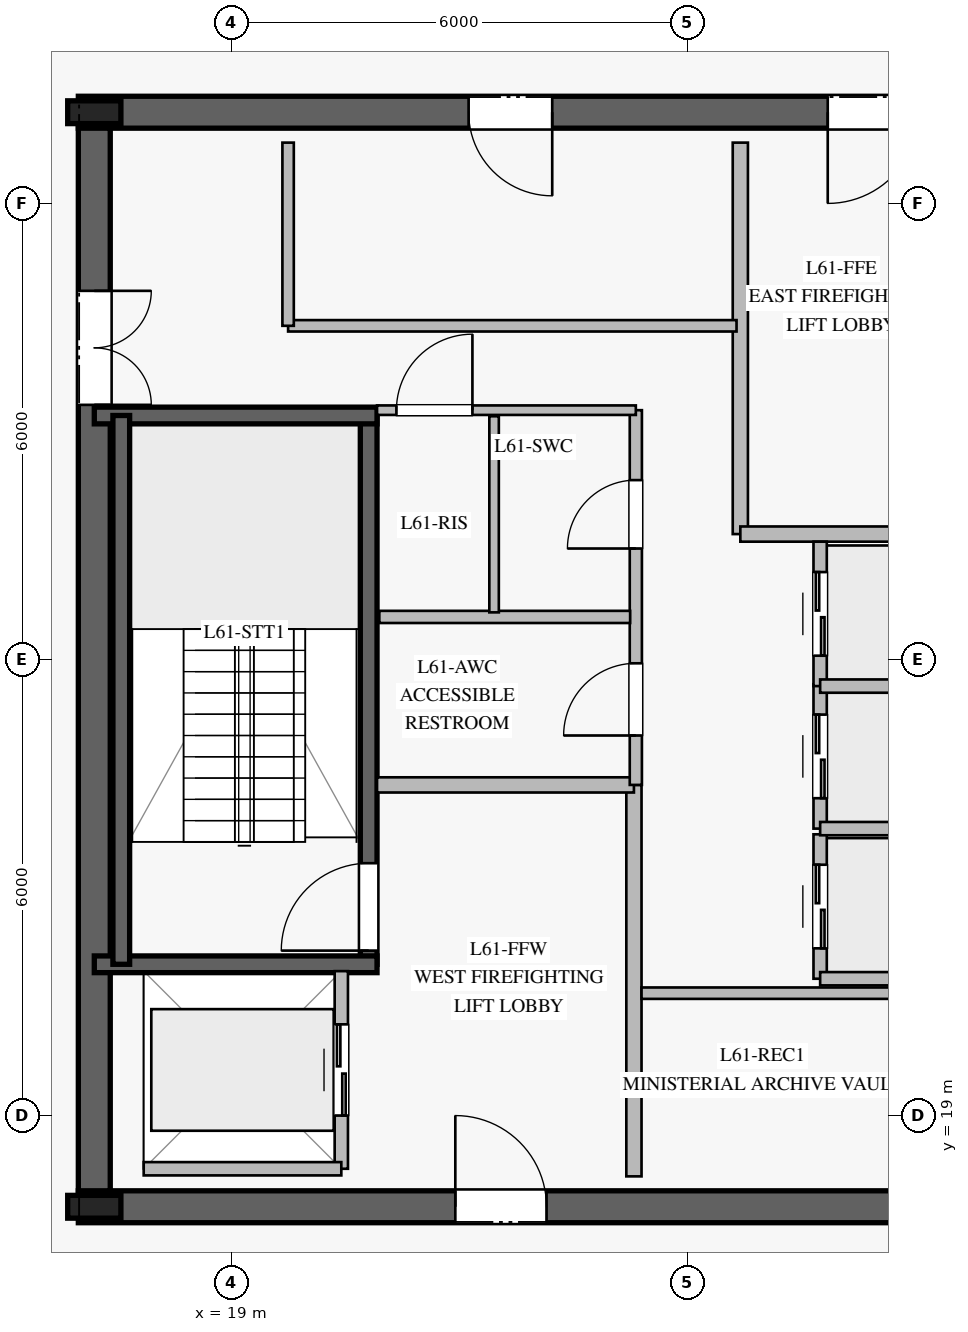
"""IFC4 building model, lengths in metres.
Left out: names, types, materials, properties, quantities, classifications, styles, units other than length and angle.
Written with IfcOpenShell. Run it as: python <this file> out.ifc"""

import sys

from ifc_helpers import new_model, si_unit, direction, frame, frame_2d, origin, origin_2d, place, context, subcontext, project, spatial, rectangle, i_section, extrude, element, fill, save


model = new_model("IFC4")
c1 = context("Model", 3, precision=1e-05, world=origin(), true_north=direction((0.0, 1.0)))
c2 = subcontext(c1, "Body", "Model", "MODEL_VIEW")
j1 = project(units=[si_unit("LENGTHUNIT", "METRE"), si_unit("PLANEANGLEUNIT", "RADIAN")], contexts=[c1])
p1 = place(None, origin())
s1 = spatial("IfcSite", under=j1, at=p1, CompositionType="ELEMENT")
p2 = place(p1, origin())
s2 = spatial("IfcBuilding", under=s1, at=p2, CompositionType="ELEMENT")
p3 = place(p2, frame((0.0, 0.0, 254.2)))
s3 = spatial("IfcBuildingStorey", under=s2, at=p3, CompositionType="ELEMENT", Elevation=254.2)
p4 = place(p3, frame((16.99, 17.8, 0.0), z_axis=(0.0, 0.0, 1.0), x_axis=(1.0, 0.0, 0.0)))
e1 = element("IfcWall", 1, at=p4, inside=s3, PredefinedType="SHEAR", context=c2, shape_type="SweptSolid", body=[
    extrude(rectangle(XDim=16.02, YDim=0.42, at=frame_2d((8.01, 0.0))), origin(), (0.0, 0.0, 1.0), 3.78),
])
p5 = place(p4, frame((4.96, 0.0, 0.0)))
e2 = element("IfcOpeningElement", 2, at=p5, cuts=e1, PredefinedType="OPENING", context=c2, shape_type="SweptSolid", body=[
    extrude(rectangle(XDim=1.2, YDim=2.25, at=frame_2d((0.6, 1.125))), frame((0.0, 0.22, 0.0), z_axis=(0.0, -1.0, 0.0), x_axis=(1.0, 0.0, 0.0)), (0.0, 0.0, 1.0), 0.44),
])
p6 = place(p4, frame((10.86, 0.0, 0.0)))
e3 = element("IfcOpeningElement", 3, at=p6, cuts=e1, PredefinedType="OPENING", context=c2, shape_type="SweptSolid", body=[
    extrude(rectangle(XDim=1.1, YDim=2.2, at=frame_2d((0.55, 1.1))), frame((0.0, 0.22, 0.0), z_axis=(0.0, -1.0, 0.0), x_axis=(1.0, 0.0, 0.0)), (0.0, 0.0, 1.0), 0.44),
])
p7 = place(p3, frame((33.01, 32.2, 0.0), z_axis=(0.0, 0.0, 1.0), x_axis=(-1.0, 0.0, 0.0)))
e4 = element("IfcWall", 4, at=p7, inside=s3, PredefinedType="SHEAR", context=c2, shape_type="SweptSolid", body=[
    extrude(rectangle(XDim=16.02, YDim=0.42, at=frame_2d((8.01, 0.0))), origin(), (0.0, 0.0, 1.0), 3.78),
])
p8 = place(p7, frame((4.96, 0.0, 0.0)))
e5 = element("IfcOpeningElement", 5, at=p8, cuts=e4, PredefinedType="OPENING", context=c2, shape_type="SweptSolid", body=[
    extrude(rectangle(XDim=1.2, YDim=2.25, at=frame_2d((0.6, 1.125))), frame((0.0, 0.22, 0.0), z_axis=(0.0, -1.0, 0.0), x_axis=(1.0, 0.0, 0.0)), (0.0, 0.0, 1.0), 0.44),
])
p9 = place(p7, frame((9.785, 0.0, 0.0)))
e6 = element("IfcOpeningElement", 6, at=p9, cuts=e4, PredefinedType="OPENING", context=c2, shape_type="SweptSolid", body=[
    extrude(rectangle(XDim=1.1, YDim=2.2, at=frame_2d((0.55, 1.1))), frame((0.0, 0.22, 0.0), z_axis=(0.0, -1.0, 0.0), x_axis=(1.0, 0.0, 0.0)), (0.0, 0.0, 1.0), 0.44),
])
p10 = place(p3, frame((17.2, 31.99, 0.0), z_axis=(0.0, 0.0, 1.0), x_axis=(0.0, -1.0, 0.0)))
e7 = element("IfcWall", 7, at=p10, inside=s3, PredefinedType="SHEAR", context=c2, shape_type="SweptSolid", body=[
    extrude(rectangle(XDim=13.98, YDim=0.42, at=frame_2d((6.99, 0.0))), origin(), (0.0, 0.0, 1.0), 3.78),
])
p11 = place(p10, frame((2.14, 0.0, 0.0)))
e8 = element("IfcOpeningElement", 8, at=p11, cuts=e7, PredefinedType="OPENING", context=c2, shape_type="SweptSolid", body=[
    extrude(rectangle(XDim=1.5, YDim=2.2, at=frame_2d((0.75, 1.1))), frame((0.0, 0.22, 0.0), z_axis=(0.0, -1.0, 0.0), x_axis=(1.0, 0.0, 0.0)), (0.0, 0.0, 1.0), 0.44),
])
for number, where, z_axis, x_axis in (
    (9, (17.2, 17.8, 0.0), (0.0, 0.0, 1.0), (1.0, 0.0, 0.0)),
    (10, (17.2, 32.2, 0.0), (0.0, 0.0, 1.0), (1.0, 0.0, 0.0)),
):
    element("IfcColumn", number, at=place(p3, frame(where, z_axis=z_axis, x_axis=x_axis)), inside=s3, PredefinedType="COLUMN", context=c2, shape_type="SweptSolid", body=[
        extrude(i_section(OverallWidth=0.3, OverallDepth=0.7, WebThickness=0.017, FlangeThickness=0.032, at=origin_2d()), origin(), (0.0, 0.0, 1.0), 4.0),
    ])
p12 = place(p3, frame((20.81, 20.99, 0.0), z_axis=(0.0, 0.0, 1.0), x_axis=(0.0, 1.0, 0.0)))
e11 = element("IfcWall", 11, at=p12, inside=s3, PredefinedType="SOLIDWALL", context=c2, shape_type="SweptSolid", body=[
    extrude(rectangle(XDim=7.22, YDim=0.22, at=frame_2d((3.61, 0.0))), origin(), (0.0, 0.0, 1.0), 3.78),
])
p13 = place(p12, frame((0.18, 0.0, 0.0)))
e12 = element("IfcOpeningElement", 12, at=p13, cuts=e11, PredefinedType="OPENING", context=c2, shape_type="SweptSolid", body=[
    extrude(rectangle(XDim=1.15, YDim=2.2, at=frame_2d((0.575, 1.1))), frame((0.0, 0.12, 0.0), z_axis=(0.0, -1.0, 0.0), x_axis=(1.0, 0.0, 0.0)), (0.0, 0.0, 1.0), 0.24),
])
for number, where, z_axis, x_axis in (
    (13, (17.2, 20.99, 0.0), (0.0, 0.0, 1.0), (1.0, 0.0, 0.0)),
    (14, (17.2, 28.21, 0.0), (0.0, 0.0, 1.0), (1.0, 0.0, 0.0)),
):
    element("IfcWall", number, at=place(p3, frame(where, z_axis=z_axis, x_axis=x_axis)), inside=s3, PredefinedType="SOLIDWALL", context=c2, shape_type="SweptSolid", body=[
        extrude(rectangle(XDim=3.72, YDim=0.22, at=frame_2d((1.86, 0.0))), origin(), (0.0, 0.0, 1.0), 3.78),
    ])
p14 = place(p3, frame((17.555, 28.21, 0.0), z_axis=(0.0, 0.0, 1.0), x_axis=(0.0, -1.0, 0.0)))
e15 = element("IfcWall", 15, at=p14, inside=s3, PredefinedType="SOLIDWALL", context=c2, shape_type="SweptSolid", body=[
    extrude(rectangle(XDim=7.22, YDim=0.22, at=frame_2d((3.61, 0.0))), origin(), (0.0, 0.0, 1.0), 3.78),
])
p15 = place(p3, frame((24.3, 18.2, 0.0), z_axis=(0.0, 0.0, 1.0), x_axis=(0.0, 1.0, 0.0)))
e16 = element("IfcWall", 16, at=p15, inside=s3, PredefinedType="PARTITIONING", context=c2, shape_type="SweptSolid", body=[
    extrude(rectangle(XDim=5.15, YDim=0.2, at=frame_2d((2.575, 0.0))), origin(), (0.0, 0.0, 1.0), 3.78),
])
p16 = place(p3, frame((20.92, 23.35, 0.0), z_axis=(0.0, 0.0, 1.0), x_axis=(1.0, 0.0, 0.0)))
e17 = element("IfcWall", 17, at=p16, inside=s3, PredefinedType="PARTITIONING", context=c2, shape_type="SweptSolid", body=[
    extrude(rectangle(XDim=3.38, YDim=0.2, at=frame_2d((1.69, 0.0))), origin(), (0.0, 0.0, 1.0), 3.78),
])
p17 = place(p3, frame((25.7, 26.65, 0.0), z_axis=(0.0, 0.0, 1.0), x_axis=(0.0, 1.0, 0.0)))
e18 = element("IfcWall", 18, at=p17, inside=s3, PredefinedType="PARTITIONING", context=c2, shape_type="SweptSolid", body=[
    extrude(rectangle(XDim=5.15, YDim=0.2, at=frame_2d((2.575, 0.0))), origin(), (0.0, 0.0, 1.0), 3.78),
])
p18 = place(p3, frame((25.7, 26.65, 0.0), z_axis=(0.0, 0.0, 1.0), x_axis=(1.0, 0.0, 0.0)))
e19 = element("IfcWall", 19, at=p18, inside=s3, PredefinedType="PARTITIONING", context=c2, shape_type="SweptSolid", body=[
    extrude(rectangle(XDim=3.38, YDim=0.2, at=frame_2d((1.69, 0.0))), origin(), (0.0, 0.0, 1.0), 3.78),
])
p19 = place(p3, frame((24.325, 23.35, 0.0), z_axis=(0.0, 0.0, 1.0), x_axis=(0.0, 1.0, 0.0)))
e20 = element("IfcWall", 20, at=p19, inside=s3, PredefinedType="PLUMBINGWALL", context=c2, shape_type="SweptSolid", body=[
    extrude(rectangle(XDim=4.93, YDim=0.16, at=frame_2d((2.465, 0.0))), origin(), (0.0, 0.0, 1.0), 3.78),
])
p20 = place(p19, frame((0.65, 0.0, 0.0)))
e21 = element("IfcOpeningElement", 21, at=p20, cuts=e20, PredefinedType="OPENING", context=c2, shape_type="SweptSolid", body=[
    extrude(rectangle(XDim=0.95, YDim=2.1, at=frame_2d((0.475, 1.05))), frame((0.0, 0.09, 0.0), z_axis=(0.0, -1.0, 0.0), x_axis=(1.0, 0.0, 0.0)), (0.0, 0.0, 1.0), 0.18),
])
p21 = place(p19, frame((3.11, 0.0, 0.0)))
e22 = element("IfcOpeningElement", 22, at=p21, cuts=e20, PredefinedType="OPENING", context=c2, shape_type="SweptSolid", body=[
    extrude(rectangle(XDim=0.9, YDim=2.1, at=frame_2d((0.45, 1.05))), frame((0.0, 0.09, 0.0), z_axis=(0.0, -1.0, 0.0), x_axis=(1.0, 0.0, 0.0)), (0.0, 0.0, 1.0), 0.18),
])
p22 = place(p3, frame((20.92, 28.28, 0.0), z_axis=(0.0, 0.0, 1.0), x_axis=(1.0, 0.0, 0.0)))
e23 = element("IfcWall", 23, at=p22, inside=s3, PredefinedType="PARTITIONING", context=c2, shape_type="SweptSolid", body=[
    extrude(rectangle(XDim=3.405, YDim=0.125, at=frame_2d((1.703, 0.0))), origin(), (0.0, 0.0, 1.0), 3.78),
])
p23 = place(p22, frame((0.255, 0.0, 0.0)))
e24 = element("IfcOpeningElement", 24, at=p23, cuts=e23, PredefinedType="OPENING", context=c2, shape_type="SweptSolid", body=[
    extrude(rectangle(XDim=1.0, YDim=2.15, at=frame_2d((0.5, 1.075))), frame((0.0, 0.073, 0.0), z_axis=(0.0, -1.0, 0.0), x_axis=(1.0, 0.0, 0.0)), (0.0, 0.0, 1.0), 0.145),
])
p24 = place(p3, frame((20.95, 25.56, 0.0), z_axis=(0.0, 0.0, 1.0), x_axis=(1.0, 0.0, 0.0)))
e25 = element("IfcWall", 25, at=p24, inside=s3, PredefinedType="PLUMBINGWALL", context=c2, shape_type="SweptSolid", body=[
    extrude(rectangle(XDim=3.3, YDim=0.16, at=frame_2d((1.65, 0.0))), origin(), (0.0, 0.0, 1.0), 3.78),
])
p25 = place(p3, frame((22.46, 25.62, 0.0), z_axis=(0.0, 0.0, 1.0), x_axis=(0.0, 1.0, 0.0)))
e26 = element("IfcWall", 26, at=p25, inside=s3, PredefinedType="PARTITIONING", context=c2, shape_type="SweptSolid", body=[
    extrude(rectangle(XDim=2.58, YDim=0.125, at=frame_2d((1.29, 0.0))), origin(), (0.0, 0.0, 1.0), 3.78),
])
p26 = place(p3, frame((24.4, 20.61, 0.0), z_axis=(0.0, 0.0, 1.0), x_axis=(1.0, 0.0, 0.0)))
e27 = element("IfcWall", 27, at=p26, inside=s3, PredefinedType="PARTITIONING", context=c2, shape_type="SweptSolid", body=[
    extrude(rectangle(XDim=5.9, YDim=0.15, at=frame_2d((2.95, 0.0))), origin(), (0.0, 0.0, 1.0), 3.78),
])
p27 = place(p3, frame((19.75, 29.39, 0.0), z_axis=(0.0, 0.0, 1.0), x_axis=(1.0, 0.0, 0.0)))
e28 = element("IfcWall", 28, at=p27, inside=s3, PredefinedType="PARTITIONING", context=c2, shape_type="SweptSolid", body=[
    extrude(rectangle(XDim=5.9, YDim=0.15, at=frame_2d((2.95, 0.0))), origin(), (0.0, 0.0, 1.0), 3.78),
])
p28 = place(p3, frame((19.75, 29.39, 0.0), z_axis=(0.0, 0.0, 1.0), x_axis=(0.0, 1.0, 0.0)))
e29 = element("IfcWall", 29, at=p28, inside=s3, PredefinedType="PARTITIONING", context=c2, shape_type="SweptSolid", body=[
    extrude(rectangle(XDim=2.41, YDim=0.15, at=frame_2d((1.205, 0.0))), origin(), (0.0, 0.0, 1.0), 3.78),
])
p29 = place(p3, frame((26.75, 20.8, 0.0), z_axis=(0.0, 0.0, 1.0), x_axis=(0.0, 1.0, 0.0)))
e30 = element("IfcWall", 30, at=p29, inside=s3, PredefinedType="PARTITIONING", context=c2, shape_type="SweptSolid", body=[
    extrude(rectangle(XDim=1.9, YDim=0.175, at=frame_2d((0.95, 0.0))), origin(), (0.0, 0.0, 1.0), 3.78),
])
p30 = place(p29, frame((0.4, 0.0, 0.0)))
e31 = element("IfcOpeningElement", 31, at=p30, cuts=e30, PredefinedType="OPENING", context=c2, shape_type="SweptSolid", body=[
    extrude(rectangle(XDim=1.1, YDim=2.2, at=frame_2d((0.55, 1.1))), frame((0.0, 0.098, 0.0), z_axis=(0.0, -1.0, 0.0), x_axis=(1.0, 0.0, 0.0)), (0.0, 0.0, 1.0), 0.195),
])
p31 = place(p3, frame((26.75, 20.8, 0.0), z_axis=(0.0, 0.0, 1.0), x_axis=(1.0, 0.0, 0.0)))
e32 = element("IfcWall", 32, at=p31, inside=s3, PredefinedType="PARTITIONING", context=c2, shape_type="SweptSolid", body=[
    extrude(rectangle(XDim=2.35, YDim=0.175, at=frame_2d((1.175, 0.0))), origin(), (0.0, 0.0, 1.0), 3.78),
])
p32 = place(p3, frame((26.75, 22.775, 0.0), z_axis=(0.0, 0.0, 1.0), x_axis=(0.0, 1.0, 0.0)))
e33 = element("IfcWall", 33, at=p32, inside=s3, PredefinedType="PARTITIONING", context=c2, shape_type="SweptSolid", body=[
    extrude(rectangle(XDim=1.9, YDim=0.175, at=frame_2d((0.95, 0.0))), origin(), (0.0, 0.0, 1.0), 3.78),
])
p33 = place(p32, frame((0.4, 0.0, 0.0)))
e34 = element("IfcOpeningElement", 34, at=p33, cuts=e33, PredefinedType="OPENING", context=c2, shape_type="SweptSolid", body=[
    extrude(rectangle(XDim=1.1, YDim=2.2, at=frame_2d((0.55, 1.1))), frame((0.0, 0.098, 0.0), z_axis=(0.0, -1.0, 0.0), x_axis=(1.0, 0.0, 0.0)), (0.0, 0.0, 1.0), 0.195),
])
p34 = place(p3, frame((26.75, 22.775, 0.0), z_axis=(0.0, 0.0, 1.0), x_axis=(1.0, 0.0, 0.0)))
e35 = element("IfcWall", 35, at=p34, inside=s3, PredefinedType="PARTITIONING", context=c2, shape_type="SweptSolid", body=[
    extrude(rectangle(XDim=2.35, YDim=0.175, at=frame_2d((1.175, 0.0))), origin(), (0.0, 0.0, 1.0), 3.78),
])
p35 = place(p3, frame((26.75, 24.65, 0.0), z_axis=(0.0, 0.0, 1.0), x_axis=(0.0, 1.0, 0.0)))
e36 = element("IfcWall", 36, at=p35, inside=s3, PredefinedType="PARTITIONING", context=c2, shape_type="SweptSolid", body=[
    extrude(rectangle(XDim=1.9, YDim=0.175, at=frame_2d((0.95, 0.0))), origin(), (0.0, 0.0, 1.0), 3.78),
])
p36 = place(p35, frame((0.4, 0.0, 0.0)))
e37 = element("IfcOpeningElement", 37, at=p36, cuts=e36, PredefinedType="OPENING", context=c2, shape_type="SweptSolid", body=[
    extrude(rectangle(XDim=1.1, YDim=2.2, at=frame_2d((0.55, 1.1))), frame((0.0, 0.098, 0.0), z_axis=(0.0, -1.0, 0.0), x_axis=(1.0, 0.0, 0.0)), (0.0, 0.0, 1.0), 0.195),
])
p37 = place(p3, frame((26.75, 24.65, 0.0), z_axis=(0.0, 0.0, 1.0), x_axis=(1.0, 0.0, 0.0)))
e38 = element("IfcWall", 38, at=p37, inside=s3, PredefinedType="PARTITIONING", context=c2, shape_type="SweptSolid", body=[
    extrude(rectangle(XDim=2.35, YDim=0.175, at=frame_2d((1.175, 0.0))), origin(), (0.0, 0.0, 1.0), 3.78),
])
p38 = place(p3, frame((20.45, 18.3, 0.0), z_axis=(0.0, 0.0, 1.0), x_axis=(0.0, 1.0, 0.0)))
e39 = element("IfcWall", 39, at=p38, inside=s3, PredefinedType="PARTITIONING", context=c2, shape_type="SweptSolid", body=[
    extrude(rectangle(XDim=2.6, YDim=0.175, at=frame_2d((1.3, 0.0))), origin(), (0.0, 0.0, 1.0), 3.78),
])
p39 = place(p38, frame((0.7, 0.0, 0.0)))
e40 = element("IfcOpeningElement", 40, at=p39, cuts=e39, PredefinedType="OPENING", context=c2, shape_type="SweptSolid", body=[
    extrude(rectangle(XDim=1.2, YDim=2.2, at=frame_2d((0.6, 1.1))), frame((0.0, 0.098, 0.0), z_axis=(0.0, -1.0, 0.0), x_axis=(1.0, 0.0, 0.0)), (0.0, 0.0, 1.0), 0.195),
])
p40 = place(p3, frame((17.85, 18.3, 0.0), z_axis=(0.0, 0.0, 1.0), x_axis=(1.0, 0.0, 0.0)))
e41 = element("IfcWall", 41, at=p40, inside=s3, PredefinedType="PARTITIONING", context=c2, shape_type="SweptSolid", body=[
    extrude(rectangle(XDim=2.6, YDim=0.175, at=frame_2d((1.3, 0.0))), origin(), (0.0, 0.0, 1.0), 3.78),
])
p41 = place(p13, origin())
e42 = element("IfcDoor", 42, at=p41, inside=s3, OperationType="SINGLE_SWING_LEFT", PredefinedType="DOOR", context=c2, shape_type="SweptSolid", body=[
    extrude(rectangle(XDim=1.15, YDim=2.2, at=frame_2d((0.575, 1.1))), frame((0.0, 0.025, 0.0), z_axis=(0.0, -1.0, 0.0), x_axis=(1.0, 0.0, 0.0)), (0.0, 0.0, 1.0), 0.05),
])
fill(e12, e42)
p42 = place(p5, origin())
e43 = element("IfcDoor", 43, at=p42, inside=s3, OperationType="SINGLE_SWING_LEFT", PredefinedType="DOOR", context=c2, shape_type="SweptSolid", body=[
    extrude(rectangle(XDim=1.2, YDim=2.25, at=frame_2d((0.6, 1.125))), frame((0.0, 0.025, 0.0), z_axis=(0.0, -1.0, 0.0), x_axis=(1.0, 0.0, 0.0)), (0.0, 0.0, 1.0), 0.05),
])
fill(e2, e43)
p43 = place(p8, origin())
e44 = element("IfcDoor", 44, at=p43, inside=s3, OperationType="SINGLE_SWING_RIGHT", PredefinedType="DOOR", context=c2, shape_type="SweptSolid", body=[
    extrude(rectangle(XDim=1.2, YDim=2.25, at=frame_2d((0.6, 1.125))), frame((0.0, 0.025, 0.0), z_axis=(0.0, -1.0, 0.0), x_axis=(1.0, 0.0, 0.0)), (0.0, 0.0, 1.0), 0.05),
])
fill(e5, e44)
p44 = place(p11, origin())
e45 = element("IfcDoor", 45, at=p44, inside=s3, OperationType="DOUBLE_DOOR_SINGLE_SWING", PredefinedType="DOOR", context=c2, shape_type="SweptSolid", body=[
    extrude(rectangle(XDim=1.5, YDim=2.2, at=frame_2d((0.75, 1.1))), frame((0.0, 0.025, 0.0), z_axis=(0.0, -1.0, 0.0), x_axis=(1.0, 0.0, 0.0)), (0.0, 0.0, 1.0), 0.05),
])
fill(e8, e45)
p45 = place(p20, origin())
e46 = element("IfcDoor", 46, at=p45, inside=s3, OperationType="SINGLE_SWING_LEFT", PredefinedType="DOOR", context=c2, shape_type="SweptSolid", body=[
    extrude(rectangle(XDim=0.95, YDim=2.1, at=frame_2d((0.475, 1.05))), frame((0.0, 0.025, 0.0), z_axis=(0.0, -1.0, 0.0), x_axis=(1.0, 0.0, 0.0)), (0.0, 0.0, 1.0), 0.05),
])
fill(e21, e46)
p46 = place(p23, origin())
e47 = element("IfcDoor", 47, at=p46, inside=s3, OperationType="SINGLE_SWING_RIGHT", PredefinedType="DOOR", context=c2, shape_type="SweptSolid", body=[
    extrude(rectangle(XDim=1.0, YDim=2.15, at=frame_2d((0.5, 1.075))), frame((0.0, 0.025, 0.0), z_axis=(0.0, -1.0, 0.0), x_axis=(1.0, 0.0, 0.0)), (0.0, 0.0, 1.0), 0.05),
])
fill(e24, e47)
p47 = place(p21, origin())
e48 = element("IfcDoor", 48, at=p47, inside=s3, OperationType="SINGLE_SWING_LEFT", PredefinedType="DOOR", context=c2, shape_type="SweptSolid", body=[
    extrude(rectangle(XDim=0.9, YDim=2.1, at=frame_2d((0.45, 1.05))), frame((0.0, 0.025, 0.0), z_axis=(0.0, -1.0, 0.0), x_axis=(1.0, 0.0, 0.0)), (0.0, 0.0, 1.0), 0.05),
])
fill(e22, e48)
p48 = place(p9, origin())
e49 = element("IfcDoor", 49, at=p48, inside=s3, OperationType="SINGLE_SWING_LEFT", PredefinedType="DOOR", context=c2, shape_type="SweptSolid", body=[
    extrude(rectangle(XDim=1.1, YDim=2.2, at=frame_2d((0.55, 1.1))), frame((0.0, 0.025, 0.0), z_axis=(0.0, -1.0, 0.0), x_axis=(1.0, 0.0, 0.0)), (0.0, 0.0, 1.0), 0.05),
])
fill(e6, e49)
p49 = place(p30, origin())
e50 = element("IfcDoor", 50, at=p49, inside=s3, OperationType="DOUBLE_DOOR_SLIDING", PredefinedType="DOOR", context=c2, shape_type="SweptSolid", body=[
    extrude(rectangle(XDim=1.1, YDim=2.2, at=frame_2d((0.55, 1.1))), frame((0.0, 0.025, 0.0), z_axis=(0.0, -1.0, 0.0), x_axis=(1.0, 0.0, 0.0)), (0.0, 0.0, 1.0), 0.05),
])
fill(e31, e50)
p50 = place(p33, origin())
e51 = element("IfcDoor", 51, at=p50, inside=s3, OperationType="DOUBLE_DOOR_SLIDING", PredefinedType="DOOR", context=c2, shape_type="SweptSolid", body=[
    extrude(rectangle(XDim=1.1, YDim=2.2, at=frame_2d((0.55, 1.1))), frame((0.0, 0.025, 0.0), z_axis=(0.0, -1.0, 0.0), x_axis=(1.0, 0.0, 0.0)), (0.0, 0.0, 1.0), 0.05),
])
fill(e34, e51)
p51 = place(p36, origin())
e52 = element("IfcDoor", 52, at=p51, inside=s3, OperationType="DOUBLE_DOOR_SLIDING", PredefinedType="DOOR", context=c2, shape_type="SweptSolid", body=[
    extrude(rectangle(XDim=1.1, YDim=2.2, at=frame_2d((0.55, 1.1))), frame((0.0, 0.025, 0.0), z_axis=(0.0, -1.0, 0.0), x_axis=(1.0, 0.0, 0.0)), (0.0, 0.0, 1.0), 0.05),
])
fill(e37, e52)
p52 = place(p39, origin())
e53 = element("IfcDoor", 53, at=p52, inside=s3, OperationType="DOUBLE_DOOR_SLIDING", PredefinedType="DOOR", context=c2, shape_type="SweptSolid", body=[
    extrude(rectangle(XDim=1.2, YDim=2.2, at=frame_2d((0.6, 1.1))), frame((0.0, 0.025, 0.0), z_axis=(0.0, -1.0, 0.0), x_axis=(1.0, 0.0, 0.0)), (0.0, 0.0, 1.0), 0.05),
])
fill(e40, e53)
save(model, sys.argv[1])
